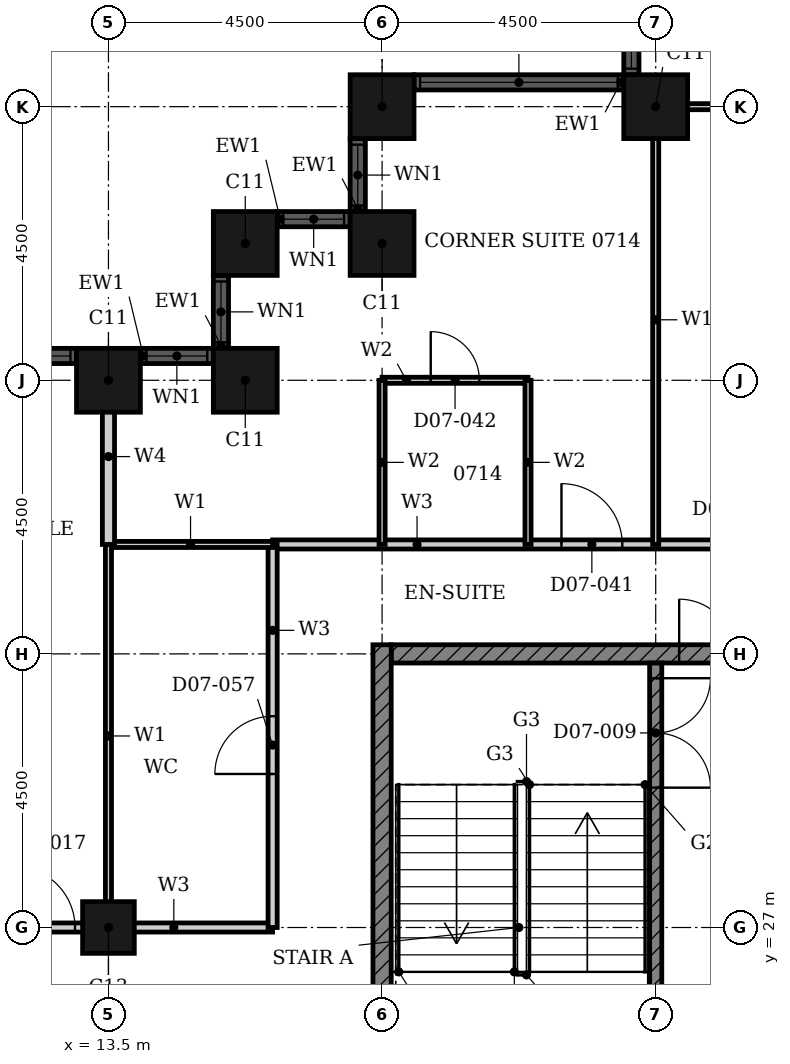
"""IFC4 building model, lengths in metres.
Left out: names, types, materials, properties, quantities, classifications, styles, units other than length and angle.
Written with IfcOpenShell. Run it as: python <this file> out.ifc"""

import sys

from ifc_helpers import new_model, si_unit, direction, frame, frame_2d, origin, origin_2d, place, context, subcontext, project, spatial, rectangle, hollow_rectangle, extrude, element, fill, save


model = new_model("IFC4")
c1 = context("Model", 3, precision=1e-05, world=origin(), true_north=direction((0.0, 1.0)))
c2 = subcontext(c1, "Body", "Model", "MODEL_VIEW")
j1 = project(units=[si_unit("LENGTHUNIT", "METRE"), si_unit("PLANEANGLEUNIT", "RADIAN")], contexts=[c1])
p1 = place(None, origin())
s1 = spatial("IfcSite", under=j1, at=p1, CompositionType="ELEMENT")
p2 = place(p1, origin())
s2 = spatial("IfcBuilding", under=s1, at=p2, CompositionType="ELEMENT")
p3 = place(p2, frame((0.0, 0.0, 37.2)))
s3 = spatial("IfcBuildingStorey", under=s2, at=p3, CompositionType="ELEMENT", Elevation=37.2)
for number, where, z_axis, x_axis in (
    (1, (22.5, 40.5, 0.0), (0.0, 0.0, 1.0), (1.0, 0.0, 0.0)),
    (2, (18.0, 40.5, 0.0), (0.0, 0.0, 1.0), (1.0, 0.0, 0.0)),
    (3, (18.0, 38.25, 0.0), (0.0, 0.0, 1.0), (1.0, 0.0, 0.0)),
    (4, (15.75, 38.25, 0.0), (0.0, 0.0, 1.0), (1.0, 0.0, 0.0)),
    (5, (15.75, 36.0, 0.0), (0.0, 0.0, 1.0), (1.0, 0.0, 0.0)),
    (6, (13.5, 36.0, 0.0), (0.0, 0.0, 1.0), (1.0, 0.0, 0.0)),
):
    element("IfcColumn", number, at=place(p3, frame(where, z_axis=z_axis, x_axis=x_axis)), inside=s3, PredefinedType="COLUMN", context=c2, shape_type="SweptSolid", body=[
        extrude(hollow_rectangle(XDim=1.05, YDim=1.05, WallThickness=0.034, at=origin_2d()), origin(), (0.0, 0.0, 1.0), 3.6),
    ])
p4 = place(p3, frame((13.5, 27.0, 0.0), z_axis=(0.0, 0.0, 1.0), x_axis=(1.0, 0.0, 0.0)))
e7 = element("IfcColumn", 7, at=p4, inside=s3, PredefinedType="COLUMN", context=c2, shape_type="SweptSolid", body=[
    extrude(hollow_rectangle(XDim=0.85, YDim=0.85, WallThickness=0.026, at=origin_2d()), origin(), (0.0, 0.0, 1.0), 3.6),
])
p5 = place(p3, frame((22.1, 48.975, 0.0), z_axis=(0.0, 0.0, 1.0), x_axis=(0.0, -1.0, 0.0)))
e8 = element("IfcWall", 8, at=p5, inside=s3, PredefinedType="SOLIDWALL", context=c2, shape_type="SweptSolid", body=[
    extrude(rectangle(XDim=7.95, YDim=0.25, at=frame_2d((3.975, 0.0))), origin(), (0.0, 0.0, 1.0), 3.6),
])
p6 = place(p5, frame((0.1, 0.0, 0.9)))
e9 = element("IfcOpeningElement", 9, at=p6, cuts=e8, PredefinedType="OPENING", context=c2, shape_type="SweptSolid", body=[
    extrude(rectangle(XDim=3.25, YDim=2.08, at=frame_2d((1.625, 1.04))), frame((0.0, 0.135, 0.0), z_axis=(0.0, -1.0, 0.0), x_axis=(1.0, 0.0, 0.0)), (0.0, 0.0, 1.0), 0.27),
])
p7 = place(p5, frame((4.6, 0.0, 0.9)))
e10 = element("IfcOpeningElement", 10, at=p7, cuts=e8, PredefinedType="OPENING", context=c2, shape_type="SweptSolid", body=[
    extrude(rectangle(XDim=3.25, YDim=2.08, at=frame_2d((1.625, 1.04))), frame((0.0, 0.135, 0.0), z_axis=(0.0, -1.0, 0.0), x_axis=(1.0, 0.0, 0.0)), (0.0, 0.0, 1.0), 0.27),
])
p8 = place(p3, frame((21.975, 40.9, 0.0), z_axis=(0.0, 0.0, 1.0), x_axis=(-1.0, 0.0, 0.0)))
e11 = element("IfcWall", 11, at=p8, inside=s3, PredefinedType="SOLIDWALL", context=c2, shape_type="SweptSolid", body=[
    extrude(rectangle(XDim=3.45, YDim=0.25, at=frame_2d((1.725, 0.0))), origin(), (0.0, 0.0, 1.0), 3.6),
])
p9 = place(p8, frame((0.1, 0.0, 0.9)))
e12 = element("IfcOpeningElement", 12, at=p9, cuts=e11, PredefinedType="OPENING", context=c2, shape_type="SweptSolid", body=[
    extrude(rectangle(XDim=3.25, YDim=2.08, at=frame_2d((1.625, 1.04))), frame((0.0, 0.135, 0.0), z_axis=(0.0, -1.0, 0.0), x_axis=(1.0, 0.0, 0.0)), (0.0, 0.0, 1.0), 0.27),
])
p10 = place(p3, frame((17.6, 39.975, 0.0), z_axis=(0.0, 0.0, 1.0), x_axis=(0.0, -1.0, 0.0)))
e13 = element("IfcWall", 13, at=p10, inside=s3, PredefinedType="SOLIDWALL", context=c2, shape_type="SweptSolid", body=[
    extrude(rectangle(XDim=1.2, YDim=0.25, at=frame_2d((0.6, 0.0))), origin(), (0.0, 0.0, 1.0), 3.6),
])
p11 = place(p10, frame((0.1, 0.0, 0.9)))
e14 = element("IfcOpeningElement", 14, at=p11, cuts=e13, PredefinedType="OPENING", context=c2, shape_type="SweptSolid", body=[
    extrude(rectangle(XDim=1.0, YDim=2.08, at=frame_2d((0.5, 1.04))), frame((0.0, 0.135, 0.0), z_axis=(0.0, -1.0, 0.0), x_axis=(1.0, 0.0, 0.0)), (0.0, 0.0, 1.0), 0.27),
])
p12 = place(p3, frame((17.475, 38.65, 0.0), z_axis=(0.0, 0.0, 1.0), x_axis=(-1.0, 0.0, 0.0)))
e15 = element("IfcWall", 15, at=p12, inside=s3, PredefinedType="SOLIDWALL", context=c2, shape_type="SweptSolid", body=[
    extrude(rectangle(XDim=1.2, YDim=0.25, at=frame_2d((0.6, 0.0))), origin(), (0.0, 0.0, 1.0), 3.6),
])
p13 = place(p12, frame((0.1, 0.0, 0.9)))
e16 = element("IfcOpeningElement", 16, at=p13, cuts=e15, PredefinedType="OPENING", context=c2, shape_type="SweptSolid", body=[
    extrude(rectangle(XDim=1.0, YDim=2.08, at=frame_2d((0.5, 1.04))), frame((0.0, 0.135, 0.0), z_axis=(0.0, -1.0, 0.0), x_axis=(1.0, 0.0, 0.0)), (0.0, 0.0, 1.0), 0.27),
])
p14 = place(p3, frame((15.35, 37.725, 0.0), z_axis=(0.0, 0.0, 1.0), x_axis=(0.0, -1.0, 0.0)))
e17 = element("IfcWall", 17, at=p14, inside=s3, PredefinedType="SOLIDWALL", context=c2, shape_type="SweptSolid", body=[
    extrude(rectangle(XDim=1.2, YDim=0.25, at=frame_2d((0.6, 0.0))), origin(), (0.0, 0.0, 1.0), 3.6),
])
p15 = place(p14, frame((0.1, 0.0, 0.9)))
e18 = element("IfcOpeningElement", 18, at=p15, cuts=e17, PredefinedType="OPENING", context=c2, shape_type="SweptSolid", body=[
    extrude(rectangle(XDim=1.0, YDim=2.08, at=frame_2d((0.5, 1.04))), frame((0.0, 0.135, 0.0), z_axis=(0.0, -1.0, 0.0), x_axis=(1.0, 0.0, 0.0)), (0.0, 0.0, 1.0), 0.27),
])
p16 = place(p3, frame((15.225, 36.4, 0.0), z_axis=(0.0, 0.0, 1.0), x_axis=(-1.0, 0.0, 0.0)))
e19 = element("IfcWall", 19, at=p16, inside=s3, PredefinedType="SOLIDWALL", context=c2, shape_type="SweptSolid", body=[
    extrude(rectangle(XDim=1.2, YDim=0.25, at=frame_2d((0.6, 0.0))), origin(), (0.0, 0.0, 1.0), 3.6),
])
p17 = place(p16, frame((0.1, 0.0, 0.9)))
e20 = element("IfcOpeningElement", 20, at=p17, cuts=e19, PredefinedType="OPENING", context=c2, shape_type="SweptSolid", body=[
    extrude(rectangle(XDim=1.0, YDim=2.08, at=frame_2d((0.5, 1.04))), frame((0.0, 0.135, 0.0), z_axis=(0.0, -1.0, 0.0), x_axis=(1.0, 0.0, 0.0)), (0.0, 0.0, 1.0), 0.27),
])
p18 = place(p3, frame((12.975, 36.4, 0.0), z_axis=(0.0, 0.0, 1.0), x_axis=(-1.0, 0.0, 0.0)))
e21 = element("IfcWall", 21, at=p18, inside=s3, PredefinedType="SOLIDWALL", context=c2, shape_type="SweptSolid", body=[
    extrude(rectangle(XDim=7.95, YDim=0.25, at=frame_2d((3.975, 0.0))), origin(), (0.0, 0.0, 1.0), 3.6),
])
p19 = place(p18, frame((0.1, 0.0, 0.9)))
e22 = element("IfcOpeningElement", 22, at=p19, cuts=e21, PredefinedType="OPENING", context=c2, shape_type="SweptSolid", body=[
    extrude(rectangle(XDim=3.25, YDim=2.08, at=frame_2d((1.625, 1.04))), frame((0.0, 0.135, 0.0), z_axis=(0.0, -1.0, 0.0), x_axis=(1.0, 0.0, 0.0)), (0.0, 0.0, 1.0), 0.27),
])
p20 = place(p18, frame((4.6, 0.0, 0.9)))
e23 = element("IfcOpeningElement", 23, at=p20, cuts=e21, PredefinedType="OPENING", context=c2, shape_type="SweptSolid", body=[
    extrude(rectangle(XDim=3.25, YDim=2.08, at=frame_2d((1.625, 1.04))), frame((0.0, 0.135, 0.0), z_axis=(0.0, -1.0, 0.0), x_axis=(1.0, 0.0, 0.0)), (0.0, 0.0, 1.0), 0.27),
])
p21 = place(p3, frame((18.15, 31.5, 0.0), z_axis=(0.0, 0.0, 1.0), x_axis=(1.0, 0.0, 0.0)))
e24 = element("IfcWall", 24, at=p21, inside=s3, PredefinedType="SHEAR", context=c2, shape_type="SweptSolid", body=[
    extrude(rectangle(XDim=6.797, YDim=0.3, at=frame_2d((3.398, 0.0))), origin(), (0.0, 0.0, 1.0), 3.3),
])
p22 = place(p21, frame((4.736, 0.0, 0.0)))
e25 = element("IfcOpeningElement", 25, at=p22, cuts=e24, PredefinedType="OPENING", context=c2, shape_type="SweptSolid", body=[
    extrude(rectangle(XDim=1.8, YDim=2.1, at=frame_2d((0.9, 1.05))), frame((0.0, 0.16, 0.0), z_axis=(0.0, -1.0, 0.0), x_axis=(1.0, 0.0, 0.0)), (0.0, 0.0, 1.0), 0.32),
])
p23 = place(p3, frame((18.0, 22.35, 0.0), z_axis=(0.0, 0.0, 1.0), x_axis=(0.0, 1.0, 0.0)))
e26 = element("IfcWall", 26, at=p23, inside=s3, PredefinedType="SHEAR", context=c2, shape_type="SweptSolid", body=[
    extrude(rectangle(XDim=9.3, YDim=0.3, at=frame_2d((4.65, 0.0))), origin(), (0.0, 0.0, 1.0), 3.3),
])
p24 = place(p3, frame((22.5, 31.35, 0.0), z_axis=(0.0, 0.0, 1.0), x_axis=(0.0, -1.0, 0.0)))
e27 = element("IfcWall", 27, at=p24, inside=s3, PredefinedType="SHEAR", context=c2, shape_type="SweptSolid", body=[
    extrude(rectangle(XDim=5.825, YDim=0.2, at=frame_2d((2.913, 0.0))), origin(), (0.0, 0.0, 1.0), 3.3),
])
p25 = place(p24, frame((0.25, 0.0, 0.0)))
e28 = element("IfcOpeningElement", 28, at=p25, cuts=e27, PredefinedType="OPENING", context=c2, shape_type="SweptSolid", body=[
    extrude(rectangle(XDim=1.8, YDim=2.1, at=frame_2d((0.9, 1.05))), frame((0.0, 0.11, 0.0), z_axis=(0.0, -1.0, 0.0), x_axis=(1.0, 0.0, 0.0)), (0.0, 0.0, 1.0), 0.22),
])
p26 = place(p3, frame((9.0, 27.0, 0.0), z_axis=(0.0, 0.0, 1.0), x_axis=(1.0, 0.0, 0.0)))
e29 = element("IfcWall", 29, at=p26, inside=s3, PredefinedType="PARTITIONING", context=c2, shape_type="SweptSolid", body=[
    extrude(rectangle(XDim=7.2, YDim=0.15, at=frame_2d((3.6, 0.0))), origin(), (0.0, 0.0, 1.0), 2.58),
])
p27 = place(p26, frame((2.95, 0.0, 0.0)))
e30 = element("IfcOpeningElement", 30, at=p27, cuts=e29, PredefinedType="OPENING", context=c2, shape_type="SweptSolid", body=[
    extrude(rectangle(XDim=1.0, YDim=2.1, at=frame_2d((0.5, 1.05))), frame((0.0, 0.085, 0.0), z_axis=(0.0, -1.0, 0.0), x_axis=(1.0, 0.0, 0.0)), (0.0, 0.0, 1.0), 0.17),
])
p28 = place(p3, frame((16.2, 33.3, 0.0), z_axis=(0.0, 0.0, 1.0), x_axis=(1.0, 0.0, 0.0)))
e31 = element("IfcWall", 31, at=p28, inside=s3, PredefinedType="PARTITIONING", context=c2, shape_type="SweptSolid", body=[
    extrude(rectangle(XDim=15.3, YDim=0.15, at=frame_2d((7.65, 0.0))), origin(), (0.0, 0.0, 1.0), 3.3),
])
p29 = place(p28, frame((4.75, 0.0, 0.0)))
e32 = element("IfcOpeningElement", 32, at=p29, cuts=e31, PredefinedType="OPENING", context=c2, shape_type="SweptSolid", body=[
    extrude(rectangle(XDim=1.0, YDim=2.1, at=frame_2d((0.5, 1.05))), frame((0.0, 0.085, 0.0), z_axis=(0.0, -1.0, 0.0), x_axis=(1.0, 0.0, 0.0)), (0.0, 0.0, 1.0), 0.17),
])
p30 = place(p28, frame((10.35, 0.0, 0.0)))
e33 = element("IfcOpeningElement", 33, at=p30, cuts=e31, PredefinedType="OPENING", context=c2, shape_type="SweptSolid", body=[
    extrude(rectangle(XDim=0.9, YDim=2.1, at=frame_2d((0.45, 1.05))), frame((0.0, 0.085, 0.0), z_axis=(0.0, -1.0, 0.0), x_axis=(1.0, 0.0, 0.0)), (0.0, 0.0, 1.0), 0.17),
])
p31 = place(p3, frame((16.2, 27.0, 0.0), z_axis=(0.0, 0.0, 1.0), x_axis=(0.0, 1.0, 0.0)))
e34 = element("IfcWall", 34, at=p31, inside=s3, PredefinedType="PARTITIONING", context=c2, shape_type="SweptSolid", body=[
    extrude(rectangle(XDim=6.3, YDim=0.15, at=frame_2d((3.15, 0.0))), origin(), (0.0, 0.0, 1.0), 3.3),
])
p32 = place(p31, frame((2.525, 0.0, 0.0)))
e35 = element("IfcOpeningElement", 35, at=p32, cuts=e34, PredefinedType="OPENING", context=c2, shape_type="SweptSolid", body=[
    extrude(rectangle(XDim=0.95, YDim=2.1, at=frame_2d((0.475, 1.05))), frame((0.0, 0.085, 0.0), z_axis=(0.0, -1.0, 0.0), x_axis=(1.0, 0.0, 0.0)), (0.0, 0.0, 1.0), 0.17),
])
p33 = place(p3, frame((13.5, 33.3, 0.0), z_axis=(0.0, 0.0, 1.0), x_axis=(1.0, 0.0, 0.0)))
e36 = element("IfcWall", 36, at=p33, inside=s3, PredefinedType="PARTITIONING", context=c2, shape_type="SweptSolid", body=[
    extrude(rectangle(XDim=2.7, YDim=0.1, at=frame_2d((1.35, 0.0))), origin(), (0.0, 0.0, 1.0), 3.3),
])
p34 = place(p3, frame((22.31, 40.5, 0.0), z_axis=(0.0, 0.0, 1.0), x_axis=(1.0, 0.0, 0.0)))
e37 = element("IfcWall", 37, at=p34, inside=s3, PredefinedType="PARTITIONING", context=c2, shape_type="SweptSolid", body=[
    extrude(rectangle(XDim=9.19, YDim=0.1, at=frame_2d((4.595, 0.0))), origin(), (0.0, 0.0, 1.0), 2.38),
])
p35 = place(p3, frame((13.5, 27.0, 0.0), z_axis=(0.0, 0.0, 1.0), x_axis=(0.0, 1.0, 0.0)))
e38 = element("IfcWall", 38, at=p35, inside=s3, PredefinedType="PARTITIONING", context=c2, shape_type="SweptSolid", body=[
    extrude(rectangle(XDim=6.3, YDim=0.1, at=frame_2d((3.15, 0.0))), origin(), (0.0, 0.0, 1.0), 2.38),
])
p36 = place(p3, frame((22.5, 33.3, 0.0), z_axis=(0.0, 0.0, 1.0), x_axis=(0.0, 1.0, 0.0)))
e39 = element("IfcWall", 39, at=p36, inside=s3, PredefinedType="PARTITIONING", context=c2, shape_type="SweptSolid", body=[
    extrude(rectangle(XDim=7.39, YDim=0.1, at=frame_2d((3.695, 0.0))), origin(), (0.0, 0.0, 1.0), 3.3),
])
p37 = place(p3, frame((13.5, 33.3, 0.0), z_axis=(0.0, 0.0, 1.0), x_axis=(0.0, 1.0, 0.0)))
e40 = element("IfcWall", 40, at=p37, inside=s3, PredefinedType="PARTITIONING", context=c2, shape_type="SweptSolid", body=[
    extrude(rectangle(XDim=2.89, YDim=0.2, at=frame_2d((1.445, 0.0))), origin(), (0.0, 0.0, 1.0), 2.38),
])
p38 = place(p3, frame((18.0, 36.0, 0.0), z_axis=(0.0, 0.0, 1.0), x_axis=(1.0, 0.0, 0.0)))
e41 = element("IfcWall", 41, at=p38, inside=s3, PredefinedType="PARTITIONING", context=c2, shape_type="SweptSolid", body=[
    extrude(rectangle(XDim=2.4, YDim=0.1, at=frame_2d((1.2, 0.0))), origin(), (0.0, 0.0, 1.0), 3.3),
])
p39 = place(p38, frame((0.8, 0.0, 0.0)))
e42 = element("IfcOpeningElement", 42, at=p39, cuts=e41, PredefinedType="OPENING", context=c2, shape_type="SweptSolid", body=[
    extrude(rectangle(XDim=0.8, YDim=2.1, at=frame_2d((0.4, 1.05))), frame((0.0, 0.06, 0.0), z_axis=(0.0, -1.0, 0.0), x_axis=(1.0, 0.0, 0.0)), (0.0, 0.0, 1.0), 0.12),
])
for number, where, z_axis, x_axis in (
    (43, (18.0, 33.3, 0.0), (0.0, 0.0, 1.0), (0.0, 1.0, 0.0)),
    (44, (20.4, 33.3, 0.0), (0.0, 0.0, 1.0), (0.0, 1.0, 0.0)),
):
    element("IfcWall", number, at=place(p3, frame(where, z_axis=z_axis, x_axis=x_axis)), inside=s3, PredefinedType="PARTITIONING", context=c2, shape_type="SweptSolid", body=[
        extrude(rectangle(XDim=2.7, YDim=0.1, at=frame_2d((1.35, 0.0))), origin(), (0.0, 0.0, 1.0), 3.3),
    ])
p40 = place(p7, origin())
e45 = element("IfcWindow", 45, at=p40, inside=s3, PartitioningType="SINGLE_PANEL", PredefinedType="WINDOW", context=c2, shape_type="SweptSolid", body=[
    extrude(rectangle(XDim=3.25, YDim=2.08, at=frame_2d((1.625, 1.04))), frame((0.0, 0.03, 0.0), z_axis=(0.0, -1.0, 0.0), x_axis=(1.0, 0.0, 0.0)), (0.0, 0.0, 1.0), 0.06),
])
fill(e10, e45)
p41 = place(p9, origin())
e46 = element("IfcWindow", 46, at=p41, inside=s3, PartitioningType="SINGLE_PANEL", PredefinedType="WINDOW", context=c2, shape_type="SweptSolid", body=[
    extrude(rectangle(XDim=3.25, YDim=2.08, at=frame_2d((1.625, 1.04))), frame((0.0, 0.03, 0.0), z_axis=(0.0, -1.0, 0.0), x_axis=(1.0, 0.0, 0.0)), (0.0, 0.0, 1.0), 0.06),
])
fill(e12, e46)
p42 = place(p11, origin())
e47 = element("IfcWindow", 47, at=p42, inside=s3, PartitioningType="SINGLE_PANEL", PredefinedType="WINDOW", context=c2, shape_type="SweptSolid", body=[
    extrude(rectangle(XDim=1.0, YDim=2.08, at=frame_2d((0.5, 1.04))), frame((0.0, 0.03, 0.0), z_axis=(0.0, -1.0, 0.0), x_axis=(1.0, 0.0, 0.0)), (0.0, 0.0, 1.0), 0.06),
])
fill(e14, e47)
p43 = place(p13, origin())
e48 = element("IfcWindow", 48, at=p43, inside=s3, PartitioningType="SINGLE_PANEL", PredefinedType="WINDOW", context=c2, shape_type="SweptSolid", body=[
    extrude(rectangle(XDim=1.0, YDim=2.08, at=frame_2d((0.5, 1.04))), frame((0.0, 0.03, 0.0), z_axis=(0.0, -1.0, 0.0), x_axis=(1.0, 0.0, 0.0)), (0.0, 0.0, 1.0), 0.06),
])
fill(e16, e48)
p44 = place(p15, origin())
e49 = element("IfcWindow", 49, at=p44, inside=s3, PartitioningType="SINGLE_PANEL", PredefinedType="WINDOW", context=c2, shape_type="SweptSolid", body=[
    extrude(rectangle(XDim=1.0, YDim=2.08, at=frame_2d((0.5, 1.04))), frame((0.0, 0.03, 0.0), z_axis=(0.0, -1.0, 0.0), x_axis=(1.0, 0.0, 0.0)), (0.0, 0.0, 1.0), 0.06),
])
fill(e18, e49)
p45 = place(p17, origin())
e50 = element("IfcWindow", 50, at=p45, inside=s3, PartitioningType="SINGLE_PANEL", PredefinedType="WINDOW", context=c2, shape_type="SweptSolid", body=[
    extrude(rectangle(XDim=1.0, YDim=2.08, at=frame_2d((0.5, 1.04))), frame((0.0, 0.03, 0.0), z_axis=(0.0, -1.0, 0.0), x_axis=(1.0, 0.0, 0.0)), (0.0, 0.0, 1.0), 0.06),
])
fill(e20, e50)
p46 = place(p19, origin())
e51 = element("IfcWindow", 51, at=p46, inside=s3, PartitioningType="SINGLE_PANEL", PredefinedType="WINDOW", context=c2, shape_type="SweptSolid", body=[
    extrude(rectangle(XDim=3.25, YDim=2.08, at=frame_2d((1.625, 1.04))), frame((0.0, 0.03, 0.0), z_axis=(0.0, -1.0, 0.0), x_axis=(1.0, 0.0, 0.0)), (0.0, 0.0, 1.0), 0.06),
])
fill(e22, e51)
p47 = place(p25, origin())
e52 = element("IfcDoor", 52, at=p47, inside=s3, OperationType="DOUBLE_DOOR_SINGLE_SWING", PredefinedType="DOOR", context=c2, shape_type="SweptSolid", body=[
    extrude(rectangle(XDim=1.8, YDim=2.1, at=frame_2d((0.9, 1.05))), frame((0.0, 0.025, 0.0), z_axis=(0.0, -1.0, 0.0), x_axis=(1.0, 0.0, 0.0)), (0.0, 0.0, 1.0), 0.05),
])
fill(e28, e52)
p48 = place(p22, origin())
e53 = element("IfcDoor", 53, at=p48, inside=s3, OperationType="DOUBLE_DOOR_SINGLE_SWING", PredefinedType="DOOR", context=c2, shape_type="SweptSolid", body=[
    extrude(rectangle(XDim=1.8, YDim=2.1, at=frame_2d((0.9, 1.05))), frame((0.0, 0.025, 0.0), z_axis=(0.0, -1.0, 0.0), x_axis=(1.0, 0.0, 0.0)), (0.0, 0.0, 1.0), 0.05),
])
fill(e25, e53)
p49 = place(p27, origin())
e54 = element("IfcDoor", 54, at=p49, inside=s3, OperationType="SINGLE_SWING_RIGHT", PredefinedType="DOOR", context=c2, shape_type="SweptSolid", body=[
    extrude(rectangle(XDim=1.0, YDim=2.1, at=frame_2d((0.5, 1.05))), frame((0.0, 0.025, 0.0), z_axis=(0.0, -1.0, 0.0), x_axis=(1.0, 0.0, 0.0)), (0.0, 0.0, 1.0), 0.05),
])
fill(e30, e54)
p50 = place(p29, origin())
e55 = element("IfcDoor", 55, at=p50, inside=s3, OperationType="SINGLE_SWING_RIGHT", PredefinedType="DOOR", context=c2, shape_type="SweptSolid", body=[
    extrude(rectangle(XDim=1.0, YDim=2.1, at=frame_2d((0.5, 1.05))), frame((0.0, 0.025, 0.0), z_axis=(0.0, -1.0, 0.0), x_axis=(1.0, 0.0, 0.0)), (0.0, 0.0, 1.0), 0.05),
])
fill(e32, e55)
p51 = place(p39, origin())
e56 = element("IfcDoor", 56, at=p51, inside=s3, OperationType="SINGLE_SWING_LEFT", PredefinedType="DOOR", context=c2, shape_type="SweptSolid", body=[
    extrude(rectangle(XDim=0.8, YDim=2.1, at=frame_2d((0.4, 1.05))), frame((0.0, 0.025, 0.0), z_axis=(0.0, -1.0, 0.0), x_axis=(1.0, 0.0, 0.0)), (0.0, 0.0, 1.0), 0.05),
])
fill(e42, e56)
p52 = place(p32, origin())
e57 = element("IfcDoor", 57, at=p52, inside=s3, OperationType="SINGLE_SWING_LEFT", PredefinedType="DOOR", context=c2, shape_type="SweptSolid", body=[
    extrude(rectangle(XDim=0.95, YDim=2.1, at=frame_2d((0.475, 1.05))), frame((0.0, 0.025, 0.0), z_axis=(0.0, -1.0, 0.0), x_axis=(1.0, 0.0, 0.0)), (0.0, 0.0, 1.0), 0.05),
])
fill(e35, e57)
save(model, sys.argv[1])
